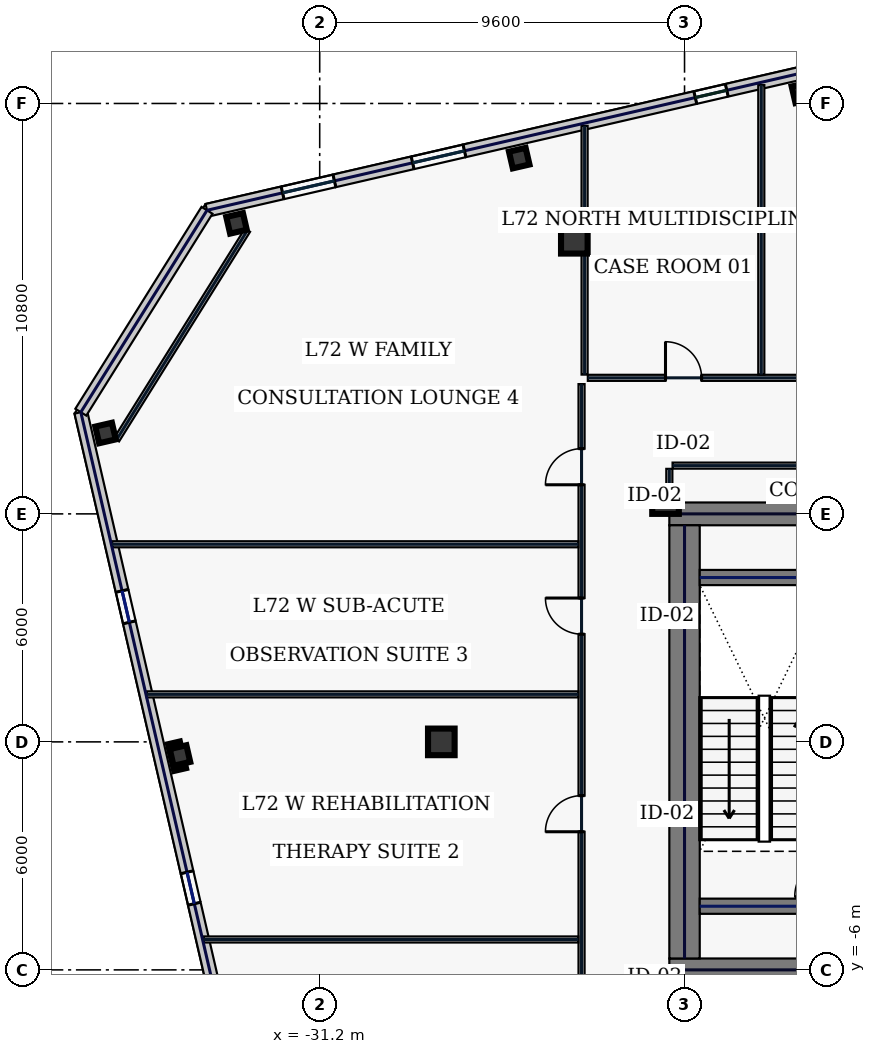
"""IFC4 building model, lengths in metres.
Left out: names, types, materials, properties, quantities, classifications, styles, units other than length and angle.
Written with IfcOpenShell. Run it as: python <this file> out.ifc"""

import sys

from ifc_helpers import new_model, si_unit, direction, frame, frame_2d, origin, origin_2d, place, context, subcontext, project, spatial, rectangle, hollow_rectangle, extrude, element, fill, save


model = new_model("IFC4")
c1 = context("Model", 3, precision=1e-05, world=origin(), true_north=direction((0.0, 1.0)))
c2 = subcontext(c1, "Body", "Model", "MODEL_VIEW")
j1 = project(units=[si_unit("LENGTHUNIT", "METRE"), si_unit("PLANEANGLEUNIT", "RADIAN")], contexts=[c1])
p1 = place(None, origin())
s1 = spatial("IfcSite", under=j1, at=p1, CompositionType="ELEMENT")
p2 = place(p1, origin())
s2 = spatial("IfcBuilding", under=s1, at=p2, CompositionType="ELEMENT")
p3 = place(p2, frame((0.0, 0.0, 309.0)))
s3 = spatial("IfcBuildingStorey", under=s2, at=p3, CompositionType="ELEMENT", Elevation=309.0)
for number, where, z_axis, x_axis in (
    (1, (-22.0, 6.0, 0.0), (0.0, 0.0, 1.0), (1.0, 0.0, 0.0)),
    (2, (-22.0, -6.0, 0.0), (0.0, 0.0, 1.0), (1.0, 0.0, 0.0)),
):
    element("IfcWall", number, at=place(p3, frame(where, z_axis=z_axis, x_axis=x_axis)), inside=s3, PredefinedType="SHEAR", context=c2, shape_type="SweptSolid", body=[
        extrude(rectangle(XDim=11.5, YDim=0.6, at=frame_2d((5.75, 0.0))), origin(), (0.0, 0.0, 1.0), 3.74),
    ])
p4 = place(p3, frame((-21.6, -5.7, 0.0), z_axis=(0.0, 0.0, 1.0), x_axis=(0.0, 1.0, 0.0)))
e3 = element("IfcWall", 3, at=p4, inside=s3, PredefinedType="SHEAR", context=c2, shape_type="SweptSolid", body=[
    extrude(rectangle(XDim=11.4, YDim=0.8, at=frame_2d((5.7, 0.0))), origin(), (0.0, 0.0, 1.0), 3.74),
])
for number, where, z_axis, x_axis in (
    (4, (-21.2, -4.325, 0.0), (0.0, 0.0, 1.0), (1.0, 0.0, 0.0)),
    (5, (-21.2, 4.325, 0.0), (0.0, 0.0, 1.0), (1.0, 0.0, 0.0)),
):
    element("IfcWall", number, at=place(p3, frame(where, z_axis=z_axis, x_axis=x_axis)), inside=s3, PredefinedType="SHEAR", context=c2, shape_type="SweptSolid", body=[
        extrude(rectangle(XDim=3.4, YDim=0.4, at=frame_2d((1.7, 0.0))), origin(), (0.0, 0.0, 1.0), 3.74),
    ])
for number, where, z_axis, x_axis in (
    (6, (-22.1, -6.35, 0.0), (0.0, 0.0, 1.0), (1.0, 0.0, 0.0)),
    (7, (-22.1, 6.35, 0.0), (0.0, 0.0, 1.0), (1.0, 0.0, 0.0)),
    (8, (-24.5, 13.2, 0.0), (0.0, 0.0, 1.0), (1.0, 0.0, 0.0)),
    (9, (-28.0, 0.0, 0.0), (0.0, 0.0, 1.0), (1.0, 0.0, 0.0)),
):
    element("IfcColumn", number, at=place(p3, frame(where, z_axis=z_axis, x_axis=x_axis)), inside=s3, PredefinedType="COLUMN", context=c2, shape_type="SweptSolid", body=[
        extrude(hollow_rectangle(XDim=0.7, YDim=0.7, WallThickness=0.032, at=origin_2d()), origin(), (0.0, 0.0, 1.0), 3.74),
    ])
for number, where, z_axis, x_axis in (
    (10, (-18.511, 17.08, 0.0), (0.0, 0.0, 1.0), (0.974, 0.225, 0.0)),
    (11, (-25.95, 15.362, 0.0), (0.0, 0.0, 1.0), (0.974, 0.225, 0.0)),
    (12, (-33.389, 13.645, 0.0), (0.0, 0.0, 1.0), (0.974, 0.225, 0.0)),
    (13, (-36.836, 8.128, 0.0), (0.0, 0.0, 1.0), (0.974, 0.225, 0.0)),
    (14, (-34.877, -0.359, 0.0), (0.0, 0.0, 1.0), (0.974, 0.225, 0.0)),
):
    element("IfcColumn", number, at=place(p3, frame(where, z_axis=z_axis, x_axis=x_axis)), inside=s3, PredefinedType="COLUMN", context=c2, shape_type="SweptSolid", body=[
        extrude(hollow_rectangle(XDim=0.45, YDim=0.45, WallThickness=0.022, at=origin_2d()), origin(), (0.0, 0.0, 1.0), 3.74),
    ])
p5 = place(p3, frame((-17.245, 17.895, 0.0), z_axis=(0.0, 0.0, 1.0), x_axis=(-0.97437318493, -0.224937539085, 0.0)))
e15 = element("IfcWall", 15, at=p5, inside=s3, PredefinedType="STANDARD", context=c2, shape_type="SweptSolid", body=[
    extrude(rectangle(XDim=17.366, YDim=0.34, at=frame_2d((8.683, 0.0))), origin(), (0.0, 0.0, 1.0), 3.74),
])
p6 = place(p5, frame((13.925, 0.0, 1.0)))
e16 = element("IfcOpeningElement", 16, at=p6, cuts=e15, PredefinedType="OPENING", context=c2, shape_type="SweptSolid", body=[
    extrude(rectangle(XDim=1.4, YDim=1.85, at=frame_2d((0.7, 0.925))), frame((0.0, 0.18, 0.0), z_axis=(0.0, -1.0, 0.0), x_axis=(1.0, 0.0, 0.0)), (0.0, 0.0, 1.0), 0.36),
])
p7 = place(p5, frame((10.413, 0.0, 1.0)))
e17 = element("IfcOpeningElement", 17, at=p7, cuts=e15, PredefinedType="OPENING", context=c2, shape_type="SweptSolid", body=[
    extrude(rectangle(XDim=1.4, YDim=1.85, at=frame_2d((0.7, 0.925))), frame((0.0, 0.18, 0.0), z_axis=(0.0, -1.0, 0.0), x_axis=(1.0, 0.0, 0.0)), (0.0, 0.0, 1.0), 0.36),
])
p8 = place(p5, frame((3.329, 0.0, 1.0)))
e18 = element("IfcOpeningElement", 18, at=p8, cuts=e15, PredefinedType="OPENING", context=c2, shape_type="SweptSolid", body=[
    extrude(rectangle(XDim=0.85, YDim=1.85, at=frame_2d((0.425, 0.925))), frame((0.0, 0.18, 0.0), z_axis=(0.0, -1.0, 0.0), x_axis=(1.0, 0.0, 0.0)), (0.0, 0.0, 1.0), 0.36),
])
p9 = place(p3, frame((-37.486, 8.676, 0.0), z_axis=(0.0, 0.0, 1.0), x_axis=(0.224953091034, -0.974369594576, 0.0)))
e19 = element("IfcWall", 19, at=p9, inside=s3, PredefinedType="STANDARD", context=c2, shape_type="SweptSolid", body=[
    extrude(rectangle(XDim=36.2, YDim=0.34, at=frame_2d((18.1, 0.0))), origin(), (0.0, 0.0, 1.0), 3.74),
])
p10 = place(p9, frame((4.825, 0.0, 0.75)))
e20 = element("IfcOpeningElement", 20, at=p10, cuts=e19, PredefinedType="OPENING", context=c2, shape_type="SweptSolid", body=[
    extrude(rectangle(XDim=0.85, YDim=1.85, at=frame_2d((0.425, 0.925))), frame((0.0, 0.18, 0.0), z_axis=(0.0, -1.0, 0.0), x_axis=(1.0, 0.0, 0.0)), (0.0, 0.0, 1.0), 0.36),
])
p11 = place(p9, frame((12.425, 0.0, 0.75)))
e21 = element("IfcOpeningElement", 21, at=p11, cuts=e19, PredefinedType="OPENING", context=c2, shape_type="SweptSolid", body=[
    extrude(rectangle(XDim=0.85, YDim=1.85, at=frame_2d((0.425, 0.925))), frame((0.0, 0.18, 0.0), z_axis=(0.0, -1.0, 0.0), x_axis=(1.0, 0.0, 0.0)), (0.0, 0.0, 1.0), 0.36),
])
p12 = place(p9, frame((21.825, 0.0, 0.58)))
e22 = element("IfcOpeningElement", 22, at=p12, cuts=e19, PredefinedType="OPENING", context=c2, shape_type="SweptSolid", body=[
    extrude(rectangle(XDim=1.6, YDim=2.3, at=frame_2d((0.8, 1.15))), frame((0.0, 0.18, 0.0), z_axis=(0.0, -1.0, 0.0), x_axis=(1.0, 0.0, 0.0)), (0.0, 0.0, 1.0), 0.36),
])
p13 = place(p9, frame((30.875, 0.0, 0.58)))
e23 = element("IfcOpeningElement", 23, at=p13, cuts=e19, PredefinedType="OPENING", context=c2, shape_type="SweptSolid", body=[
    extrude(rectangle(XDim=1.6, YDim=2.3, at=frame_2d((0.8, 1.15))), frame((0.0, 0.18, 0.0), z_axis=(0.0, -1.0, 0.0), x_axis=(1.0, 0.0, 0.0)), (0.0, 0.0, 1.0), 0.36),
])
p14 = place(p3, frame((-34.166, 13.989, 0.0), z_axis=(0.0, 0.0, 1.0), x_axis=(-0.529935887993, -0.848037708252, 0.0)))
e24 = element("IfcWall", 24, at=p14, inside=s3, PredefinedType="STANDARD", context=c2, shape_type="SweptSolid", body=[
    extrude(rectangle(XDim=6.265, YDim=0.34, at=frame_2d((3.133, 0.0))), origin(), (0.0, 0.0, 1.0), 3.74),
])
p15 = place(p3, frame((-33.1, 13.465, 0.0), z_axis=(0.0, 0.0, 1.0), x_axis=(-0.529958457806, -0.848023604035, 0.0)))
e25 = element("IfcWall", 25, at=p15, inside=s3, PredefinedType="PARTITIONING", context=c2, shape_type="SweptSolid", body=[
    extrude(rectangle(XDim=6.505, YDim=0.16, at=frame_2d((3.252, 0.0))), origin(), (0.0, 0.0, 1.0), 3.74),
])
p16 = place(p3, frame((-24.31, -9.215, 0.0), z_axis=(0.0, 0.0, 1.0), x_axis=(0.0, 1.0, 0.0)))
e26 = element("IfcWall", 26, at=p16, inside=s3, PredefinedType="PARTITIONING", context=c2, shape_type="SweptSolid", body=[
    extrude(rectangle(XDim=18.63, YDim=0.16, at=frame_2d((9.315, 0.0))), origin(), (0.0, 0.0, 1.0), 3.74),
])
p17 = place(p16, frame((1.769, 0.0, 0.0)))
e27 = element("IfcOpeningElement", 27, at=p17, cuts=e26, PredefinedType="OPENING", context=c2, shape_type="SweptSolid", body=[
    extrude(rectangle(XDim=0.95, YDim=2.2, at=frame_2d((0.475, 1.1))), frame((0.0, 0.09, 0.0), z_axis=(0.0, -1.0, 0.0), x_axis=(1.0, 0.0, 0.0)), (0.0, 0.0, 1.0), 0.18),
])
p18 = place(p16, frame((6.85, 0.0, 0.0)))
e28 = element("IfcOpeningElement", 28, at=p18, cuts=e26, PredefinedType="OPENING", context=c2, shape_type="SweptSolid", body=[
    extrude(rectangle(XDim=0.95, YDim=2.2, at=frame_2d((0.475, 1.1))), frame((0.0, 0.09, 0.0), z_axis=(0.0, -1.0, 0.0), x_axis=(1.0, 0.0, 0.0)), (0.0, 0.0, 1.0), 0.18),
])
p19 = place(p16, frame((12.05, 0.0, 0.0)))
e29 = element("IfcOpeningElement", 29, at=p19, cuts=e26, PredefinedType="OPENING", context=c2, shape_type="SweptSolid", body=[
    extrude(rectangle(XDim=0.95, YDim=2.2, at=frame_2d((0.475, 1.1))), frame((0.0, 0.09, 0.0), z_axis=(0.0, -1.0, 0.0), x_axis=(1.0, 0.0, 0.0)), (0.0, 0.0, 1.0), 0.18),
])
p20 = place(p16, frame((15.981, 0.0, 0.0)))
e30 = element("IfcOpeningElement", 30, at=p20, cuts=e26, PredefinedType="OPENING", context=c2, shape_type="SweptSolid", body=[
    extrude(rectangle(XDim=0.95, YDim=2.2, at=frame_2d((0.475, 1.1))), frame((0.0, 0.09, 0.0), z_axis=(0.0, -1.0, 0.0), x_axis=(1.0, 0.0, 0.0)), (0.0, 0.0, 1.0), 0.18),
])
p21 = place(p3, frame((-24.145, 9.58, 0.0), z_axis=(0.0, 0.0, 1.0), x_axis=(1.0, 0.0, 0.0)))
e31 = element("IfcWall", 31, at=p21, inside=s3, PredefinedType="PARTITIONING", context=c2, shape_type="SweptSolid", body=[
    extrude(rectangle(XDim=48.29, YDim=0.16, at=frame_2d((24.145, 0.0))), origin(), (0.0, 0.0, 1.0), 3.74),
])
p22 = place(p21, frame((2.044, 0.0, 0.0)))
e32 = element("IfcOpeningElement", 32, at=p22, cuts=e31, PredefinedType="OPENING", context=c2, shape_type="SweptSolid", body=[
    extrude(rectangle(XDim=0.95, YDim=2.2, at=frame_2d((0.475, 1.1))), frame((0.0, 0.09, 0.0), z_axis=(0.0, -1.0, 0.0), x_axis=(1.0, 0.0, 0.0)), (0.0, 0.0, 1.0), 0.18),
])
p23 = place(p21, frame((10.39, 0.0, 0.0)))
e33 = element("IfcOpeningElement", 33, at=p23, cuts=e31, PredefinedType="OPENING", context=c2, shape_type="SweptSolid", body=[
    extrude(rectangle(XDim=1.45, YDim=2.2, at=frame_2d((0.725, 1.1))), frame((0.0, 0.09, 0.0), z_axis=(0.0, -1.0, 0.0), x_axis=(1.0, 0.0, 0.0)), (0.0, 0.0, 1.0), 0.18),
])
p24 = place(p21, frame((21.2, 0.0, 0.0)))
e34 = element("IfcOpeningElement", 34, at=p24, cuts=e31, PredefinedType="OPENING", context=c2, shape_type="SweptSolid", body=[
    extrude(rectangle(XDim=1.05, YDim=2.2, at=frame_2d((0.525, 1.1))), frame((0.0, 0.09, 0.0), z_axis=(0.0, -1.0, 0.0), x_axis=(1.0, 0.0, 0.0)), (0.0, 0.0, 1.0), 0.18),
])
p25 = place(p21, frame((29.785, 0.0, 0.0)))
e35 = element("IfcOpeningElement", 35, at=p25, cuts=e31, PredefinedType="OPENING", context=c2, shape_type="SweptSolid", body=[
    extrude(rectangle(XDim=1.3, YDim=2.2, at=frame_2d((0.65, 1.1))), frame((0.0, 0.09, 0.0), z_axis=(0.0, -1.0, 0.0), x_axis=(1.0, 0.0, 0.0)), (0.0, 0.0, 1.0), 0.18),
])
p26 = place(p21, frame((35.92, 0.0, 0.0)))
e36 = element("IfcOpeningElement", 36, at=p26, cuts=e31, PredefinedType="OPENING", context=c2, shape_type="SweptSolid", body=[
    extrude(rectangle(XDim=0.95, YDim=2.2, at=frame_2d((0.475, 1.1))), frame((0.0, 0.09, 0.0), z_axis=(0.0, -1.0, 0.0), x_axis=(1.0, 0.0, 0.0)), (0.0, 0.0, 1.0), 0.18),
])
p27 = place(p21, frame((41.31, 0.0, 0.0)))
e37 = element("IfcOpeningElement", 37, at=p27, cuts=e31, PredefinedType="OPENING", context=c2, shape_type="SweptSolid", body=[
    extrude(rectangle(XDim=0.95, YDim=2.2, at=frame_2d((0.475, 1.1))), frame((0.0, 0.09, 0.0), z_axis=(0.0, -1.0, 0.0), x_axis=(1.0, 0.0, 0.0)), (0.0, 0.0, 1.0), 0.18),
])
p28 = place(p21, frame((45.466, 0.0, 0.0)))
e38 = element("IfcOpeningElement", 38, at=p28, cuts=e31, PredefinedType="OPENING", context=c2, shape_type="SweptSolid", body=[
    extrude(rectangle(XDim=0.95, YDim=2.2, at=frame_2d((0.475, 1.1))), frame((0.0, 0.09, 0.0), z_axis=(0.0, -1.0, 0.0), x_axis=(1.0, 0.0, 0.0)), (0.0, 0.0, 1.0), 0.18),
])
p29 = place(p3, frame((-10.715, 7.27, 0.0), z_axis=(0.0, 0.0, 1.0), x_axis=(-1.0, 0.0, 0.0)))
e39 = element("IfcWall", 39, at=p29, inside=s3, PredefinedType="PARTITIONING", context=c2, shape_type="SweptSolid", body=[
    extrude(rectangle(XDim=11.2, YDim=0.16, at=frame_2d((5.6, 0.0))), origin(), (0.0, 0.0, 1.0), 3.74),
])
p30 = place(p3, frame((-22.0, 7.185, 0.0), z_axis=(0.0, 0.0, 1.0), x_axis=(0.0, -1.0, 0.0)))
e40 = element("IfcWall", 40, at=p30, inside=s3, PredefinedType="PARTITIONING", context=c2, shape_type="SweptSolid", body=[
    extrude(rectangle(XDim=0.765, YDim=0.16, at=frame_2d((0.383, 0.0))), origin(), (0.0, 0.0, 1.0), 3.74),
])
p31 = place(p3, frame((-24.23, 9.665, 0.0), z_axis=(0.0, 0.0, 1.0), x_axis=(0.0, 1.0, 0.0)))
e41 = element("IfcWall", 41, at=p31, inside=s3, PredefinedType="PARTITIONING", context=c2, shape_type="SweptSolid", body=[
    extrude(rectangle(XDim=6.546, YDim=0.16, at=frame_2d((3.273, 0.0))), origin(), (0.0, 0.0, 1.0), 3.74),
])
p32 = place(p3, frame((-19.58, 9.665, 0.0), z_axis=(0.0, 0.0, 1.0), x_axis=(0.0, 1.0, 0.0)))
e42 = element("IfcWall", 42, at=p32, inside=s3, PredefinedType="PARTITIONING", context=c2, shape_type="SweptSolid", body=[
    extrude(rectangle(XDim=7.619, YDim=0.16, at=frame_2d((3.81, 0.0))), origin(), (0.0, 0.0, 1.0), 3.74),
])
p33 = place(p3, frame((-34.262, -5.2, 0.0), z_axis=(0.0, 0.0, 1.0), x_axis=(1.0, 0.0, 0.0)))
e43 = element("IfcWall", 43, at=p33, inside=s3, PredefinedType="PARTITIONING", context=c2, shape_type="SweptSolid", body=[
    extrude(rectangle(XDim=9.867, YDim=0.16, at=frame_2d((4.933, 0.0))), origin(), (0.0, 0.0, 1.0), 3.74),
])
p34 = place(p3, frame((-35.751, 1.25, 0.0), z_axis=(0.0, 0.0, 1.0), x_axis=(1.0, 0.0, 0.0)))
e44 = element("IfcWall", 44, at=p34, inside=s3, PredefinedType="PARTITIONING", context=c2, shape_type="SweptSolid", body=[
    extrude(rectangle(XDim=11.356, YDim=0.16, at=frame_2d((5.678, 0.0))), origin(), (0.0, 0.0, 1.0), 3.74),
])
p35 = place(p3, frame((-36.663, 5.2, 0.0), z_axis=(0.0, 0.0, 1.0), x_axis=(1.0, 0.0, 0.0)))
e45 = element("IfcWall", 45, at=p35, inside=s3, PredefinedType="PARTITIONING", context=c2, shape_type="SweptSolid", body=[
    extrude(rectangle(XDim=12.268, YDim=0.16, at=frame_2d((6.134, 0.0))), origin(), (0.0, 0.0, 1.0), 3.74),
])
p36 = place(p6, origin())
e46 = element("IfcWindow", 46, at=p36, inside=s3, PartitioningType="SINGLE_PANEL", PredefinedType="WINDOW", context=c2, shape_type="SweptSolid", body=[
    extrude(rectangle(XDim=1.4, YDim=1.85, at=frame_2d((0.7, 0.925))), frame((0.0, 0.03, 0.0), z_axis=(0.0, -1.0, 0.0), x_axis=(1.0, 0.0, 0.0)), (0.0, 0.0, 1.0), 0.06),
])
fill(e16, e46)
p37 = place(p7, origin())
e47 = element("IfcWindow", 47, at=p37, inside=s3, PartitioningType="SINGLE_PANEL", PredefinedType="WINDOW", context=c2, shape_type="SweptSolid", body=[
    extrude(rectangle(XDim=1.4, YDim=1.85, at=frame_2d((0.7, 0.925))), frame((0.0, 0.03, 0.0), z_axis=(0.0, -1.0, 0.0), x_axis=(1.0, 0.0, 0.0)), (0.0, 0.0, 1.0), 0.06),
])
fill(e17, e47)
p38 = place(p8, origin())
e48 = element("IfcWindow", 48, at=p38, inside=s3, PartitioningType="SINGLE_PANEL", PredefinedType="WINDOW", context=c2, shape_type="SweptSolid", body=[
    extrude(rectangle(XDim=0.85, YDim=1.85, at=frame_2d((0.425, 0.925))), frame((0.0, 0.03, 0.0), z_axis=(0.0, -1.0, 0.0), x_axis=(1.0, 0.0, 0.0)), (0.0, 0.0, 1.0), 0.06),
])
fill(e18, e48)
p39 = place(p10, origin())
e49 = element("IfcWindow", 49, at=p39, inside=s3, PartitioningType="SINGLE_PANEL", PredefinedType="WINDOW", context=c2, shape_type="SweptSolid", body=[
    extrude(rectangle(XDim=0.85, YDim=1.85, at=frame_2d((0.425, 0.925))), frame((0.0, 0.03, 0.0), z_axis=(0.0, -1.0, 0.0), x_axis=(1.0, 0.0, 0.0)), (0.0, 0.0, 1.0), 0.06),
])
fill(e20, e49)
p40 = place(p11, origin())
e50 = element("IfcWindow", 50, at=p40, inside=s3, PartitioningType="SINGLE_PANEL", PredefinedType="WINDOW", context=c2, shape_type="SweptSolid", body=[
    extrude(rectangle(XDim=0.85, YDim=1.85, at=frame_2d((0.425, 0.925))), frame((0.0, 0.03, 0.0), z_axis=(0.0, -1.0, 0.0), x_axis=(1.0, 0.0, 0.0)), (0.0, 0.0, 1.0), 0.06),
])
fill(e21, e50)
p41 = place(p22, origin())
e51 = element("IfcDoor", 51, at=p41, inside=s3, OperationType="SINGLE_SWING_LEFT", PredefinedType="DOOR", context=c2, shape_type="SweptSolid", body=[
    extrude(rectangle(XDim=0.95, YDim=2.2, at=frame_2d((0.475, 1.1))), frame((0.0, 0.025, 0.0), z_axis=(0.0, -1.0, 0.0), x_axis=(1.0, 0.0, 0.0)), (0.0, 0.0, 1.0), 0.05),
])
fill(e32, e51)
p42 = place(p18, origin())
e52 = element("IfcDoor", 52, at=p42, inside=s3, OperationType="SINGLE_SWING_LEFT", PredefinedType="DOOR", context=c2, shape_type="SweptSolid", body=[
    extrude(rectangle(XDim=0.95, YDim=2.2, at=frame_2d((0.475, 1.1))), frame((0.0, 0.025, 0.0), z_axis=(0.0, -1.0, 0.0), x_axis=(1.0, 0.0, 0.0)), (0.0, 0.0, 1.0), 0.05),
])
fill(e28, e52)
p43 = place(p19, origin())
e53 = element("IfcDoor", 53, at=p43, inside=s3, OperationType="SINGLE_SWING_RIGHT", PredefinedType="DOOR", context=c2, shape_type="SweptSolid", body=[
    extrude(rectangle(XDim=0.95, YDim=2.2, at=frame_2d((0.475, 1.1))), frame((0.0, 0.025, 0.0), z_axis=(0.0, -1.0, 0.0), x_axis=(1.0, 0.0, 0.0)), (0.0, 0.0, 1.0), 0.05),
])
fill(e29, e53)
p44 = place(p20, origin())
e54 = element("IfcDoor", 54, at=p44, inside=s3, OperationType="SINGLE_SWING_LEFT", PredefinedType="DOOR", context=c2, shape_type="SweptSolid", body=[
    extrude(rectangle(XDim=0.95, YDim=2.2, at=frame_2d((0.475, 1.1))), frame((0.0, 0.025, 0.0), z_axis=(0.0, -1.0, 0.0), x_axis=(1.0, 0.0, 0.0)), (0.0, 0.0, 1.0), 0.05),
])
fill(e30, e54)
save(model, sys.argv[1])
